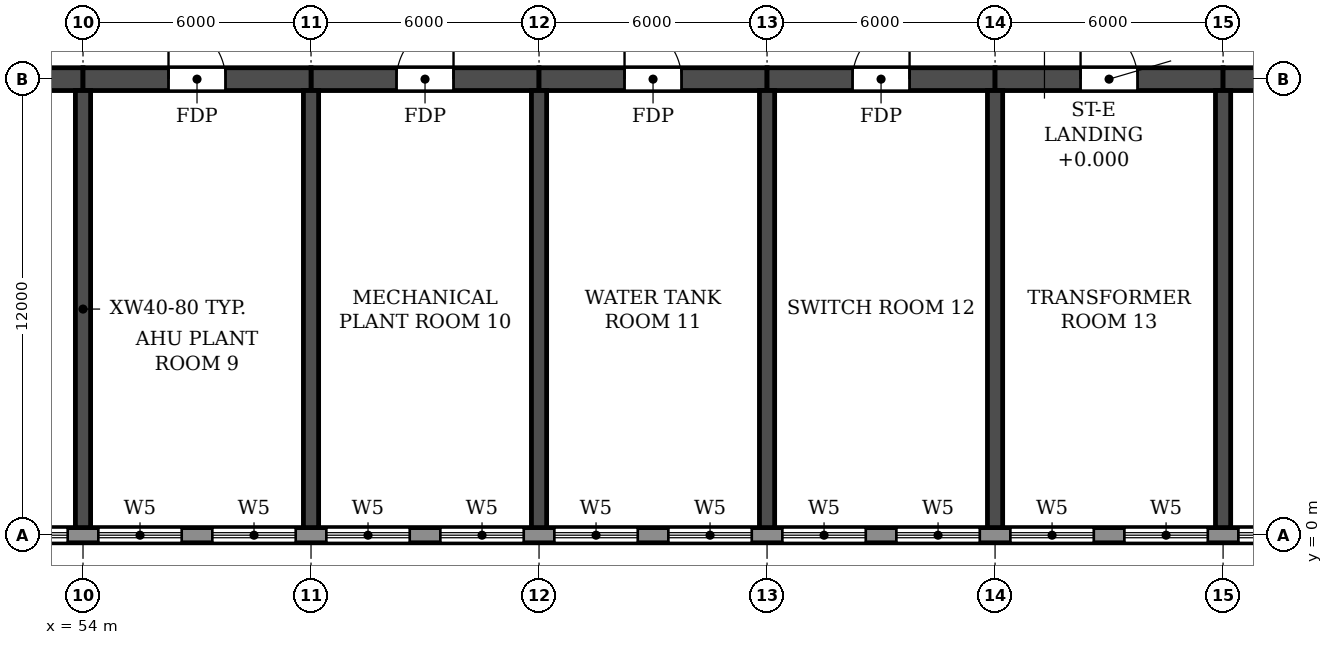
"""IFC4 building model, lengths in metres.
Left out: names, types, materials, properties, quantities, classifications, styles, units other than length and angle.
Written with IfcOpenShell. Run it as: python <this file> out.ifc"""

import sys

from ifc_helpers import new_model, si_unit, direction, frame, frame_2d, origin, place, context, subcontext, project, spatial, rectangle, extrude, element, fill, save


model = new_model("IFC4")
c1 = context("Model", 3, precision=1e-05, world=origin(), true_north=direction((0.0, 1.0)))
c2 = subcontext(c1, "Body", "Model", "MODEL_VIEW")
j1 = project(units=[si_unit("LENGTHUNIT", "METRE"), si_unit("PLANEANGLEUNIT", "RADIAN")], contexts=[c1])
p1 = place(None, origin())
s1 = spatial("IfcSite", under=j1, at=p1, CompositionType="ELEMENT")
p2 = place(p1, origin())
s2 = spatial("IfcBuilding", under=s1, at=p2, CompositionType="ELEMENT")
p3 = place(p2, frame((0.0, 0.0, 66.3)))
s3 = spatial("IfcBuildingStorey", under=s2, at=p3, CompositionType="ELEMENT", Elevation=66.3)
for number, where, z_axis, x_axis in (
    (1, (54.0, 0.2, 0.0), (0.0, 0.0, 1.0), (0.0, 1.0, 0.0)),
    (2, (60.0, 0.2, 0.0), (0.0, 0.0, 1.0), (0.0, 1.0, 0.0)),
    (3, (66.0, 0.2, 0.0), (0.0, 0.0, 1.0), (0.0, 1.0, 0.0)),
    (4, (72.0, 0.2, 0.0), (0.0, 0.0, 1.0), (0.0, 1.0, 0.0)),
    (5, (78.0, 0.2, 0.0), (0.0, 0.0, 1.0), (0.0, 1.0, 0.0)),
    (6, (84.0, 0.2, 0.0), (0.0, 0.0, 1.0), (0.0, 1.0, 0.0)),
):
    element("IfcWall", number, at=place(p3, frame(where, z_axis=z_axis, x_axis=x_axis)), inside=s3, PredefinedType="SHEAR", context=c2, shape_type="SweptSolid", body=[
        extrude(rectangle(XDim=11.5, YDim=0.4, at=frame_2d((5.75, 0.0))), origin(), (0.0, 0.0, 1.0), 6.36),
    ])
p4 = place(p3, frame((48.0, 12.0, 0.0), z_axis=(0.0, 0.0, 1.0), x_axis=(1.0, 0.0, 0.0)))
e7 = element("IfcWall", 7, at=p4, inside=s3, PredefinedType="SHEAR", context=c2, shape_type="SweptSolid", body=[
    extrude(rectangle(XDim=6.0, YDim=0.6, at=frame_2d((3.0, 0.0))), origin(), (0.0, 0.0, 1.0), 6.36),
])
p5 = place(p4, frame((2.25, 0.0, 0.0)))
e8 = element("IfcOpeningElement", 8, at=p5, cuts=e7, PredefinedType="OPENING", context=c2, shape_type="SweptSolid", body=[
    extrude(rectangle(XDim=1.5, YDim=2.1, at=frame_2d((0.75, 1.05))), frame((0.0, 0.31, 0.0), z_axis=(0.0, -1.0, 0.0), x_axis=(1.0, 0.0, 0.0)), (0.0, 0.0, 1.0), 0.62),
])
p6 = place(p3, frame((54.0, 12.0, 0.0), z_axis=(0.0, 0.0, 1.0), x_axis=(1.0, 0.0, 0.0)))
e9 = element("IfcWall", 9, at=p6, inside=s3, PredefinedType="SHEAR", context=c2, shape_type="SweptSolid", body=[
    extrude(rectangle(XDim=6.0, YDim=0.6, at=frame_2d((3.0, 0.0))), origin(), (0.0, 0.0, 1.0), 6.36),
])
p7 = place(p6, frame((2.25, 0.0, 0.0)))
e10 = element("IfcOpeningElement", 10, at=p7, cuts=e9, PredefinedType="OPENING", context=c2, shape_type="SweptSolid", body=[
    extrude(rectangle(XDim=1.5, YDim=2.1, at=frame_2d((0.75, 1.05))), frame((0.0, 0.31, 0.0), z_axis=(0.0, -1.0, 0.0), x_axis=(1.0, 0.0, 0.0)), (0.0, 0.0, 1.0), 0.62),
])
p8 = place(p3, frame((60.0, 12.0, 0.0), z_axis=(0.0, 0.0, 1.0), x_axis=(1.0, 0.0, 0.0)))
e11 = element("IfcWall", 11, at=p8, inside=s3, PredefinedType="SHEAR", context=c2, shape_type="SweptSolid", body=[
    extrude(rectangle(XDim=6.0, YDim=0.6, at=frame_2d((3.0, 0.0))), origin(), (0.0, 0.0, 1.0), 6.36),
])
p9 = place(p8, frame((2.25, 0.0, 0.0)))
e12 = element("IfcOpeningElement", 12, at=p9, cuts=e11, PredefinedType="OPENING", context=c2, shape_type="SweptSolid", body=[
    extrude(rectangle(XDim=1.5, YDim=2.1, at=frame_2d((0.75, 1.05))), frame((0.0, 0.31, 0.0), z_axis=(0.0, -1.0, 0.0), x_axis=(1.0, 0.0, 0.0)), (0.0, 0.0, 1.0), 0.62),
])
p10 = place(p3, frame((66.0, 12.0, 0.0), z_axis=(0.0, 0.0, 1.0), x_axis=(1.0, 0.0, 0.0)))
e13 = element("IfcWall", 13, at=p10, inside=s3, PredefinedType="SHEAR", context=c2, shape_type="SweptSolid", body=[
    extrude(rectangle(XDim=6.0, YDim=0.6, at=frame_2d((3.0, 0.0))), origin(), (0.0, 0.0, 1.0), 6.36),
])
p11 = place(p10, frame((2.25, 0.0, 0.0)))
e14 = element("IfcOpeningElement", 14, at=p11, cuts=e13, PredefinedType="OPENING", context=c2, shape_type="SweptSolid", body=[
    extrude(rectangle(XDim=1.5, YDim=2.1, at=frame_2d((0.75, 1.05))), frame((0.0, 0.31, 0.0), z_axis=(0.0, -1.0, 0.0), x_axis=(1.0, 0.0, 0.0)), (0.0, 0.0, 1.0), 0.62),
])
p12 = place(p3, frame((72.0, 12.0, 0.0), z_axis=(0.0, 0.0, 1.0), x_axis=(1.0, 0.0, 0.0)))
e15 = element("IfcWall", 15, at=p12, inside=s3, PredefinedType="SHEAR", context=c2, shape_type="SweptSolid", body=[
    extrude(rectangle(XDim=6.0, YDim=0.6, at=frame_2d((3.0, 0.0))), origin(), (0.0, 0.0, 1.0), 6.36),
])
p13 = place(p12, frame((2.25, 0.0, 0.0)))
e16 = element("IfcOpeningElement", 16, at=p13, cuts=e15, PredefinedType="OPENING", context=c2, shape_type="SweptSolid", body=[
    extrude(rectangle(XDim=1.5, YDim=2.1, at=frame_2d((0.75, 1.05))), frame((0.0, 0.31, 0.0), z_axis=(0.0, -1.0, 0.0), x_axis=(1.0, 0.0, 0.0)), (0.0, 0.0, 1.0), 0.62),
])
p14 = place(p3, frame((78.0, 12.0, 0.0), z_axis=(0.0, 0.0, 1.0), x_axis=(1.0, 0.0, 0.0)))
e17 = element("IfcWall", 17, at=p14, inside=s3, PredefinedType="SHEAR", context=c2, shape_type="SweptSolid", body=[
    extrude(rectangle(XDim=6.0, YDim=0.6, at=frame_2d((3.0, 0.0))), origin(), (0.0, 0.0, 1.0), 6.36),
])
p15 = place(p14, frame((2.25, 0.0, 0.0)))
e18 = element("IfcOpeningElement", 18, at=p15, cuts=e17, PredefinedType="OPENING", context=c2, shape_type="SweptSolid", body=[
    extrude(rectangle(XDim=1.5, YDim=2.1, at=frame_2d((0.75, 1.05))), frame((0.0, 0.31, 0.0), z_axis=(0.0, -1.0, 0.0), x_axis=(1.0, 0.0, 0.0)), (0.0, 0.0, 1.0), 0.62),
])
p16 = place(p3, frame((84.0, 12.0, 0.0), z_axis=(0.0, 0.0, 1.0), x_axis=(1.0, 0.0, 0.0)))
e19 = element("IfcWall", 19, at=p16, inside=s3, PredefinedType="SHEAR", context=c2, shape_type="SweptSolid", body=[
    extrude(rectangle(XDim=6.0, YDim=0.6, at=frame_2d((3.0, 0.0))), origin(), (0.0, 0.0, 1.0), 6.36),
])
p17 = place(p16, frame((2.25, 0.0, 0.0)))
e20 = element("IfcOpeningElement", 20, at=p17, cuts=e19, PredefinedType="OPENING", context=c2, shape_type="SweptSolid", body=[
    extrude(rectangle(XDim=1.5, YDim=2.1, at=frame_2d((0.75, 1.05))), frame((0.0, 0.31, 0.0), z_axis=(0.0, -1.0, 0.0), x_axis=(1.0, 0.0, 0.0)), (0.0, 0.0, 1.0), 0.62),
])
p18 = place(p3, frame((10.683, 0.0, 0.0), z_axis=(0.0, 0.0, 1.0), x_axis=(1.0, 0.0, 0.0)))
e21 = element("IfcWall", 21, at=p18, inside=s3, PredefinedType="STANDARD", context=c2, shape_type="SweptSolid", body=[
    extrude(rectangle(XDim=80.634, YDim=0.4, at=frame_2d((40.317, 0.0))), origin(), (0.0, 0.0, 1.0), 6.36),
])
p19 = place(p18, frame((1.717, 0.0, 0.6)))
e22 = element("IfcOpeningElement", 22, at=p19, cuts=e21, PredefinedType="OPENING", context=c2, shape_type="SweptSolid", body=[
    extrude(rectangle(XDim=2.2, YDim=2.4, at=frame_2d((1.1, 1.2))), frame((0.0, 0.21, 0.0), z_axis=(0.0, -1.0, 0.0), x_axis=(1.0, 0.0, 0.0)), (0.0, 0.0, 1.0), 0.42),
])
p20 = place(p18, frame((4.717, 0.0, 0.6)))
e23 = element("IfcOpeningElement", 23, at=p20, cuts=e21, PredefinedType="OPENING", context=c2, shape_type="SweptSolid", body=[
    extrude(rectangle(XDim=2.2, YDim=2.4, at=frame_2d((1.1, 1.2))), frame((0.0, 0.21, 0.0), z_axis=(0.0, -1.0, 0.0), x_axis=(1.0, 0.0, 0.0)), (0.0, 0.0, 1.0), 0.42),
])
p21 = place(p18, frame((7.717, 0.0, 0.6)))
e24 = element("IfcOpeningElement", 24, at=p21, cuts=e21, PredefinedType="OPENING", context=c2, shape_type="SweptSolid", body=[
    extrude(rectangle(XDim=2.2, YDim=2.4, at=frame_2d((1.1, 1.2))), frame((0.0, 0.21, 0.0), z_axis=(0.0, -1.0, 0.0), x_axis=(1.0, 0.0, 0.0)), (0.0, 0.0, 1.0), 0.42),
])
p22 = place(p18, frame((10.717, 0.0, 0.6)))
e25 = element("IfcOpeningElement", 25, at=p22, cuts=e21, PredefinedType="OPENING", context=c2, shape_type="SweptSolid", body=[
    extrude(rectangle(XDim=2.2, YDim=2.4, at=frame_2d((1.1, 1.2))), frame((0.0, 0.21, 0.0), z_axis=(0.0, -1.0, 0.0), x_axis=(1.0, 0.0, 0.0)), (0.0, 0.0, 1.0), 0.42),
])
p23 = place(p18, frame((13.717, 0.0, 0.6)))
e26 = element("IfcOpeningElement", 26, at=p23, cuts=e21, PredefinedType="OPENING", context=c2, shape_type="SweptSolid", body=[
    extrude(rectangle(XDim=2.2, YDim=2.4, at=frame_2d((1.1, 1.2))), frame((0.0, 0.21, 0.0), z_axis=(0.0, -1.0, 0.0), x_axis=(1.0, 0.0, 0.0)), (0.0, 0.0, 1.0), 0.42),
])
p24 = place(p18, frame((16.717, 0.0, 0.6)))
e27 = element("IfcOpeningElement", 27, at=p24, cuts=e21, PredefinedType="OPENING", context=c2, shape_type="SweptSolid", body=[
    extrude(rectangle(XDim=2.2, YDim=2.4, at=frame_2d((1.1, 1.2))), frame((0.0, 0.21, 0.0), z_axis=(0.0, -1.0, 0.0), x_axis=(1.0, 0.0, 0.0)), (0.0, 0.0, 1.0), 0.42),
])
p25 = place(p18, frame((19.717, 0.0, 0.6)))
e28 = element("IfcOpeningElement", 28, at=p25, cuts=e21, PredefinedType="OPENING", context=c2, shape_type="SweptSolid", body=[
    extrude(rectangle(XDim=2.2, YDim=2.4, at=frame_2d((1.1, 1.2))), frame((0.0, 0.21, 0.0), z_axis=(0.0, -1.0, 0.0), x_axis=(1.0, 0.0, 0.0)), (0.0, 0.0, 1.0), 0.42),
])
p26 = place(p18, frame((22.717, 0.0, 0.6)))
e29 = element("IfcOpeningElement", 29, at=p26, cuts=e21, PredefinedType="OPENING", context=c2, shape_type="SweptSolid", body=[
    extrude(rectangle(XDim=2.2, YDim=2.4, at=frame_2d((1.1, 1.2))), frame((0.0, 0.21, 0.0), z_axis=(0.0, -1.0, 0.0), x_axis=(1.0, 0.0, 0.0)), (0.0, 0.0, 1.0), 0.42),
])
p27 = place(p18, frame((25.717, 0.0, 0.6)))
e30 = element("IfcOpeningElement", 30, at=p27, cuts=e21, PredefinedType="OPENING", context=c2, shape_type="SweptSolid", body=[
    extrude(rectangle(XDim=2.2, YDim=2.4, at=frame_2d((1.1, 1.2))), frame((0.0, 0.21, 0.0), z_axis=(0.0, -1.0, 0.0), x_axis=(1.0, 0.0, 0.0)), (0.0, 0.0, 1.0), 0.42),
])
p28 = place(p18, frame((28.717, 0.0, 0.6)))
e31 = element("IfcOpeningElement", 31, at=p28, cuts=e21, PredefinedType="OPENING", context=c2, shape_type="SweptSolid", body=[
    extrude(rectangle(XDim=2.2, YDim=2.4, at=frame_2d((1.1, 1.2))), frame((0.0, 0.21, 0.0), z_axis=(0.0, -1.0, 0.0), x_axis=(1.0, 0.0, 0.0)), (0.0, 0.0, 1.0), 0.42),
])
p29 = place(p18, frame((31.717, 0.0, 0.6)))
e32 = element("IfcOpeningElement", 32, at=p29, cuts=e21, PredefinedType="OPENING", context=c2, shape_type="SweptSolid", body=[
    extrude(rectangle(XDim=2.2, YDim=2.4, at=frame_2d((1.1, 1.2))), frame((0.0, 0.21, 0.0), z_axis=(0.0, -1.0, 0.0), x_axis=(1.0, 0.0, 0.0)), (0.0, 0.0, 1.0), 0.42),
])
p30 = place(p18, frame((34.717, 0.0, 0.6)))
e33 = element("IfcOpeningElement", 33, at=p30, cuts=e21, PredefinedType="OPENING", context=c2, shape_type="SweptSolid", body=[
    extrude(rectangle(XDim=2.2, YDim=2.4, at=frame_2d((1.1, 1.2))), frame((0.0, 0.21, 0.0), z_axis=(0.0, -1.0, 0.0), x_axis=(1.0, 0.0, 0.0)), (0.0, 0.0, 1.0), 0.42),
])
p31 = place(p18, frame((37.717, 0.0, 0.6)))
e34 = element("IfcOpeningElement", 34, at=p31, cuts=e21, PredefinedType="OPENING", context=c2, shape_type="SweptSolid", body=[
    extrude(rectangle(XDim=2.2, YDim=2.4, at=frame_2d((1.1, 1.2))), frame((0.0, 0.21, 0.0), z_axis=(0.0, -1.0, 0.0), x_axis=(1.0, 0.0, 0.0)), (0.0, 0.0, 1.0), 0.42),
])
p32 = place(p18, frame((40.717, 0.0, 0.6)))
e35 = element("IfcOpeningElement", 35, at=p32, cuts=e21, PredefinedType="OPENING", context=c2, shape_type="SweptSolid", body=[
    extrude(rectangle(XDim=2.2, YDim=2.4, at=frame_2d((1.1, 1.2))), frame((0.0, 0.21, 0.0), z_axis=(0.0, -1.0, 0.0), x_axis=(1.0, 0.0, 0.0)), (0.0, 0.0, 1.0), 0.42),
])
p33 = place(p18, frame((43.717, 0.0, 0.6)))
e36 = element("IfcOpeningElement", 36, at=p33, cuts=e21, PredefinedType="OPENING", context=c2, shape_type="SweptSolid", body=[
    extrude(rectangle(XDim=2.2, YDim=2.4, at=frame_2d((1.1, 1.2))), frame((0.0, 0.21, 0.0), z_axis=(0.0, -1.0, 0.0), x_axis=(1.0, 0.0, 0.0)), (0.0, 0.0, 1.0), 0.42),
])
p34 = place(p18, frame((46.717, 0.0, 0.6)))
e37 = element("IfcOpeningElement", 37, at=p34, cuts=e21, PredefinedType="OPENING", context=c2, shape_type="SweptSolid", body=[
    extrude(rectangle(XDim=2.2, YDim=2.4, at=frame_2d((1.1, 1.2))), frame((0.0, 0.21, 0.0), z_axis=(0.0, -1.0, 0.0), x_axis=(1.0, 0.0, 0.0)), (0.0, 0.0, 1.0), 0.42),
])
p35 = place(p18, frame((49.717, 0.0, 0.6)))
e38 = element("IfcOpeningElement", 38, at=p35, cuts=e21, PredefinedType="OPENING", context=c2, shape_type="SweptSolid", body=[
    extrude(rectangle(XDim=2.2, YDim=2.4, at=frame_2d((1.1, 1.2))), frame((0.0, 0.21, 0.0), z_axis=(0.0, -1.0, 0.0), x_axis=(1.0, 0.0, 0.0)), (0.0, 0.0, 1.0), 0.42),
])
p36 = place(p18, frame((52.717, 0.0, 0.6)))
e39 = element("IfcOpeningElement", 39, at=p36, cuts=e21, PredefinedType="OPENING", context=c2, shape_type="SweptSolid", body=[
    extrude(rectangle(XDim=2.2, YDim=2.4, at=frame_2d((1.1, 1.2))), frame((0.0, 0.21, 0.0), z_axis=(0.0, -1.0, 0.0), x_axis=(1.0, 0.0, 0.0)), (0.0, 0.0, 1.0), 0.42),
])
p37 = place(p18, frame((55.717, 0.0, 0.6)))
e40 = element("IfcOpeningElement", 40, at=p37, cuts=e21, PredefinedType="OPENING", context=c2, shape_type="SweptSolid", body=[
    extrude(rectangle(XDim=2.2, YDim=2.4, at=frame_2d((1.1, 1.2))), frame((0.0, 0.21, 0.0), z_axis=(0.0, -1.0, 0.0), x_axis=(1.0, 0.0, 0.0)), (0.0, 0.0, 1.0), 0.42),
])
p38 = place(p18, frame((58.717, 0.0, 0.6)))
e41 = element("IfcOpeningElement", 41, at=p38, cuts=e21, PredefinedType="OPENING", context=c2, shape_type="SweptSolid", body=[
    extrude(rectangle(XDim=2.2, YDim=2.4, at=frame_2d((1.1, 1.2))), frame((0.0, 0.21, 0.0), z_axis=(0.0, -1.0, 0.0), x_axis=(1.0, 0.0, 0.0)), (0.0, 0.0, 1.0), 0.42),
])
p39 = place(p18, frame((61.717, 0.0, 0.6)))
e42 = element("IfcOpeningElement", 42, at=p39, cuts=e21, PredefinedType="OPENING", context=c2, shape_type="SweptSolid", body=[
    extrude(rectangle(XDim=2.2, YDim=2.4, at=frame_2d((1.1, 1.2))), frame((0.0, 0.21, 0.0), z_axis=(0.0, -1.0, 0.0), x_axis=(1.0, 0.0, 0.0)), (0.0, 0.0, 1.0), 0.42),
])
p40 = place(p18, frame((64.717, 0.0, 0.6)))
e43 = element("IfcOpeningElement", 43, at=p40, cuts=e21, PredefinedType="OPENING", context=c2, shape_type="SweptSolid", body=[
    extrude(rectangle(XDim=2.2, YDim=2.4, at=frame_2d((1.1, 1.2))), frame((0.0, 0.21, 0.0), z_axis=(0.0, -1.0, 0.0), x_axis=(1.0, 0.0, 0.0)), (0.0, 0.0, 1.0), 0.42),
])
p41 = place(p18, frame((67.717, 0.0, 0.6)))
e44 = element("IfcOpeningElement", 44, at=p41, cuts=e21, PredefinedType="OPENING", context=c2, shape_type="SweptSolid", body=[
    extrude(rectangle(XDim=2.2, YDim=2.4, at=frame_2d((1.1, 1.2))), frame((0.0, 0.21, 0.0), z_axis=(0.0, -1.0, 0.0), x_axis=(1.0, 0.0, 0.0)), (0.0, 0.0, 1.0), 0.42),
])
p42 = place(p18, frame((70.717, 0.0, 0.6)))
e45 = element("IfcOpeningElement", 45, at=p42, cuts=e21, PredefinedType="OPENING", context=c2, shape_type="SweptSolid", body=[
    extrude(rectangle(XDim=2.2, YDim=2.4, at=frame_2d((1.1, 1.2))), frame((0.0, 0.21, 0.0), z_axis=(0.0, -1.0, 0.0), x_axis=(1.0, 0.0, 0.0)), (0.0, 0.0, 1.0), 0.42),
])
p43 = place(p18, frame((73.717, 0.0, 0.6)))
e46 = element("IfcOpeningElement", 46, at=p43, cuts=e21, PredefinedType="OPENING", context=c2, shape_type="SweptSolid", body=[
    extrude(rectangle(XDim=2.2, YDim=2.4, at=frame_2d((1.1, 1.2))), frame((0.0, 0.21, 0.0), z_axis=(0.0, -1.0, 0.0), x_axis=(1.0, 0.0, 0.0)), (0.0, 0.0, 1.0), 0.42),
])
p44 = place(p18, frame((76.717, 0.0, 0.6)))
e47 = element("IfcOpeningElement", 47, at=p44, cuts=e21, PredefinedType="OPENING", context=c2, shape_type="SweptSolid", body=[
    extrude(rectangle(XDim=2.2, YDim=2.4, at=frame_2d((1.1, 1.2))), frame((0.0, 0.21, 0.0), z_axis=(0.0, -1.0, 0.0), x_axis=(1.0, 0.0, 0.0)), (0.0, 0.0, 1.0), 0.42),
])
p45 = place(p32, origin())
e48 = element("IfcWindow", 48, at=p45, inside=s3, PartitioningType="TRIPLE_PANEL_HORIZONTAL", PredefinedType="WINDOW", context=c2, shape_type="SweptSolid", body=[
    extrude(rectangle(XDim=2.2, YDim=2.4, at=frame_2d((1.1, 1.2))), frame((0.0, 0.03, 0.0), z_axis=(0.0, -1.0, 0.0), x_axis=(1.0, 0.0, 0.0)), (0.0, 0.0, 1.0), 0.06),
])
fill(e35, e48)
p46 = place(p33, origin())
e49 = element("IfcWindow", 49, at=p46, inside=s3, PartitioningType="TRIPLE_PANEL_HORIZONTAL", PredefinedType="WINDOW", context=c2, shape_type="SweptSolid", body=[
    extrude(rectangle(XDim=2.2, YDim=2.4, at=frame_2d((1.1, 1.2))), frame((0.0, 0.03, 0.0), z_axis=(0.0, -1.0, 0.0), x_axis=(1.0, 0.0, 0.0)), (0.0, 0.0, 1.0), 0.06),
])
fill(e36, e49)
p47 = place(p34, origin())
e50 = element("IfcWindow", 50, at=p47, inside=s3, PartitioningType="TRIPLE_PANEL_HORIZONTAL", PredefinedType="WINDOW", context=c2, shape_type="SweptSolid", body=[
    extrude(rectangle(XDim=2.2, YDim=2.4, at=frame_2d((1.1, 1.2))), frame((0.0, 0.03, 0.0), z_axis=(0.0, -1.0, 0.0), x_axis=(1.0, 0.0, 0.0)), (0.0, 0.0, 1.0), 0.06),
])
fill(e37, e50)
p48 = place(p35, origin())
e51 = element("IfcWindow", 51, at=p48, inside=s3, PartitioningType="TRIPLE_PANEL_HORIZONTAL", PredefinedType="WINDOW", context=c2, shape_type="SweptSolid", body=[
    extrude(rectangle(XDim=2.2, YDim=2.4, at=frame_2d((1.1, 1.2))), frame((0.0, 0.03, 0.0), z_axis=(0.0, -1.0, 0.0), x_axis=(1.0, 0.0, 0.0)), (0.0, 0.0, 1.0), 0.06),
])
fill(e38, e51)
p49 = place(p36, origin())
e52 = element("IfcWindow", 52, at=p49, inside=s3, PartitioningType="TRIPLE_PANEL_HORIZONTAL", PredefinedType="WINDOW", context=c2, shape_type="SweptSolid", body=[
    extrude(rectangle(XDim=2.2, YDim=2.4, at=frame_2d((1.1, 1.2))), frame((0.0, 0.03, 0.0), z_axis=(0.0, -1.0, 0.0), x_axis=(1.0, 0.0, 0.0)), (0.0, 0.0, 1.0), 0.06),
])
fill(e39, e52)
p50 = place(p37, origin())
e53 = element("IfcWindow", 53, at=p50, inside=s3, PartitioningType="TRIPLE_PANEL_HORIZONTAL", PredefinedType="WINDOW", context=c2, shape_type="SweptSolid", body=[
    extrude(rectangle(XDim=2.2, YDim=2.4, at=frame_2d((1.1, 1.2))), frame((0.0, 0.03, 0.0), z_axis=(0.0, -1.0, 0.0), x_axis=(1.0, 0.0, 0.0)), (0.0, 0.0, 1.0), 0.06),
])
fill(e40, e53)
p51 = place(p38, origin())
e54 = element("IfcWindow", 54, at=p51, inside=s3, PartitioningType="TRIPLE_PANEL_HORIZONTAL", PredefinedType="WINDOW", context=c2, shape_type="SweptSolid", body=[
    extrude(rectangle(XDim=2.2, YDim=2.4, at=frame_2d((1.1, 1.2))), frame((0.0, 0.03, 0.0), z_axis=(0.0, -1.0, 0.0), x_axis=(1.0, 0.0, 0.0)), (0.0, 0.0, 1.0), 0.06),
])
fill(e41, e54)
p52 = place(p39, origin())
e55 = element("IfcWindow", 55, at=p52, inside=s3, PartitioningType="TRIPLE_PANEL_HORIZONTAL", PredefinedType="WINDOW", context=c2, shape_type="SweptSolid", body=[
    extrude(rectangle(XDim=2.2, YDim=2.4, at=frame_2d((1.1, 1.2))), frame((0.0, 0.03, 0.0), z_axis=(0.0, -1.0, 0.0), x_axis=(1.0, 0.0, 0.0)), (0.0, 0.0, 1.0), 0.06),
])
fill(e42, e55)
p53 = place(p40, origin())
e56 = element("IfcWindow", 56, at=p53, inside=s3, PartitioningType="TRIPLE_PANEL_HORIZONTAL", PredefinedType="WINDOW", context=c2, shape_type="SweptSolid", body=[
    extrude(rectangle(XDim=2.2, YDim=2.4, at=frame_2d((1.1, 1.2))), frame((0.0, 0.03, 0.0), z_axis=(0.0, -1.0, 0.0), x_axis=(1.0, 0.0, 0.0)), (0.0, 0.0, 1.0), 0.06),
])
fill(e43, e56)
p54 = place(p41, origin())
e57 = element("IfcWindow", 57, at=p54, inside=s3, PartitioningType="TRIPLE_PANEL_HORIZONTAL", PredefinedType="WINDOW", context=c2, shape_type="SweptSolid", body=[
    extrude(rectangle(XDim=2.2, YDim=2.4, at=frame_2d((1.1, 1.2))), frame((0.0, 0.03, 0.0), z_axis=(0.0, -1.0, 0.0), x_axis=(1.0, 0.0, 0.0)), (0.0, 0.0, 1.0), 0.06),
])
fill(e44, e57)
p55 = place(p42, origin())
e58 = element("IfcWindow", 58, at=p55, inside=s3, PartitioningType="TRIPLE_PANEL_HORIZONTAL", PredefinedType="WINDOW", context=c2, shape_type="SweptSolid", body=[
    extrude(rectangle(XDim=2.2, YDim=2.4, at=frame_2d((1.1, 1.2))), frame((0.0, 0.03, 0.0), z_axis=(0.0, -1.0, 0.0), x_axis=(1.0, 0.0, 0.0)), (0.0, 0.0, 1.0), 0.06),
])
fill(e45, e58)
p56 = place(p43, origin())
e59 = element("IfcWindow", 59, at=p56, inside=s3, PartitioningType="TRIPLE_PANEL_HORIZONTAL", PredefinedType="WINDOW", context=c2, shape_type="SweptSolid", body=[
    extrude(rectangle(XDim=2.2, YDim=2.4, at=frame_2d((1.1, 1.2))), frame((0.0, 0.03, 0.0), z_axis=(0.0, -1.0, 0.0), x_axis=(1.0, 0.0, 0.0)), (0.0, 0.0, 1.0), 0.06),
])
fill(e46, e59)
p57 = place(p7, origin())
e60 = element("IfcDoor", 60, at=p57, inside=s3, OperationType="DOUBLE_DOOR_SINGLE_SWING", PredefinedType="DOOR", context=c2, shape_type="SweptSolid", body=[
    extrude(rectangle(XDim=1.5, YDim=2.1, at=frame_2d((0.75, 1.05))), frame((0.0, 0.025, 0.0), z_axis=(0.0, -1.0, 0.0), x_axis=(1.0, 0.0, 0.0)), (0.0, 0.0, 1.0), 0.05),
])
fill(e10, e60)
p58 = place(p9, origin())
e61 = element("IfcDoor", 61, at=p58, inside=s3, OperationType="DOUBLE_DOOR_SINGLE_SWING", PredefinedType="DOOR", context=c2, shape_type="SweptSolid", body=[
    extrude(rectangle(XDim=1.5, YDim=2.1, at=frame_2d((0.75, 1.05))), frame((0.0, 0.025, 0.0), z_axis=(0.0, -1.0, 0.0), x_axis=(1.0, 0.0, 0.0)), (0.0, 0.0, 1.0), 0.05),
])
fill(e12, e61)
p59 = place(p11, origin())
e62 = element("IfcDoor", 62, at=p59, inside=s3, OperationType="DOUBLE_DOOR_SINGLE_SWING", PredefinedType="DOOR", context=c2, shape_type="SweptSolid", body=[
    extrude(rectangle(XDim=1.5, YDim=2.1, at=frame_2d((0.75, 1.05))), frame((0.0, 0.025, 0.0), z_axis=(0.0, -1.0, 0.0), x_axis=(1.0, 0.0, 0.0)), (0.0, 0.0, 1.0), 0.05),
])
fill(e14, e62)
p60 = place(p13, origin())
e63 = element("IfcDoor", 63, at=p60, inside=s3, OperationType="DOUBLE_DOOR_SINGLE_SWING", PredefinedType="DOOR", context=c2, shape_type="SweptSolid", body=[
    extrude(rectangle(XDim=1.5, YDim=2.1, at=frame_2d((0.75, 1.05))), frame((0.0, 0.025, 0.0), z_axis=(0.0, -1.0, 0.0), x_axis=(1.0, 0.0, 0.0)), (0.0, 0.0, 1.0), 0.05),
])
fill(e16, e63)
p61 = place(p15, origin())
e64 = element("IfcDoor", 64, at=p61, inside=s3, OperationType="DOUBLE_DOOR_SINGLE_SWING", PredefinedType="DOOR", context=c2, shape_type="SweptSolid", body=[
    extrude(rectangle(XDim=1.5, YDim=2.1, at=frame_2d((0.75, 1.05))), frame((0.0, 0.025, 0.0), z_axis=(0.0, -1.0, 0.0), x_axis=(1.0, 0.0, 0.0)), (0.0, 0.0, 1.0), 0.05),
])
fill(e18, e64)
save(model, sys.argv[1])
